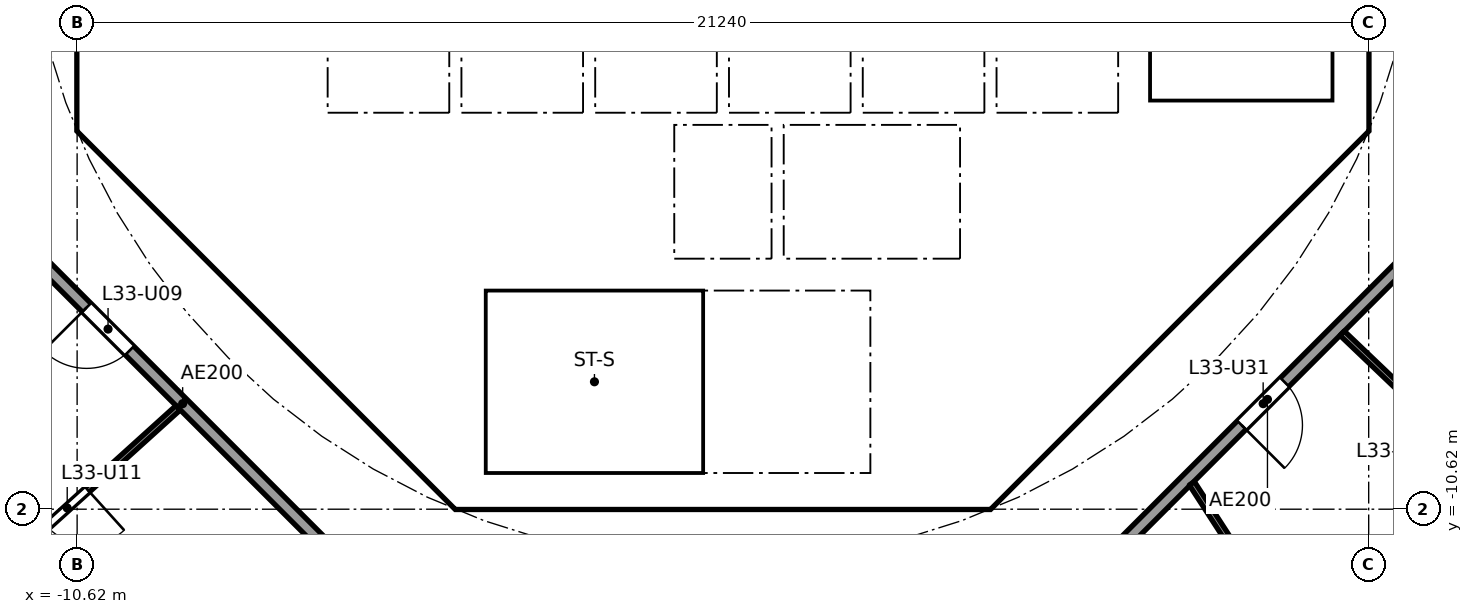
"""IFC4 building model, lengths in metres.
Left out: names, types, materials, properties, quantities, classifications, styles, units other than length and angle.
Written with IfcOpenShell. Run it as: python <this file> out.ifc"""

import sys

from ifc_helpers import new_model, si_unit, direction, frame, frame_2d, origin, place, context, subcontext, project, spatial, polyline, rectangle, outline, extrude, element, fill, save


model = new_model("IFC4")
c1 = context("Model", 3, precision=1e-05, world=origin(), true_north=direction((0.0, 1.0)))
c2 = subcontext(c1, "Body", "Model", "MODEL_VIEW")
j1 = project(units=[si_unit("LENGTHUNIT", "METRE"), si_unit("PLANEANGLEUNIT", "RADIAN")], contexts=[c1])
p1 = place(None, origin())
s1 = spatial("IfcSite", under=j1, at=p1, CompositionType="ELEMENT")
p2 = place(p1, origin())
s2 = spatial("IfcBuilding", under=s1, at=p2, CompositionType="ELEMENT")
p3 = place(p2, frame((0.0, 0.0, 134.4)))
s3 = spatial("IfcBuildingStorey", under=s2, at=p3, CompositionType="ELEMENT", Elevation=134.4)
p4 = place(p3, frame((-10.325, 3.801, 0.0), z_axis=(0.0, 0.0, 1.0), x_axis=(0.0, -1.0, 0.0)))
e1 = element("IfcWall", 1, at=p4, inside=s3, PredefinedType="SHEAR", context=c2, shape_type="SweptSolid", body=[
    extrude(rectangle(XDim=7.602, YDim=0.6, at=frame_2d((3.801, 0.0))), origin(), (0.0, 0.0, 1.0), 3.44),
])
p5 = place(p4, frame((0.651, 0.0, 0.0)))
e2 = element("IfcOpeningElement", 2, at=p5, cuts=e1, PredefinedType="OPENING", context=c2, shape_type="SweptSolid", body=[
    extrude(rectangle(XDim=1.5, YDim=2.1, at=frame_2d((0.75, 1.05))), frame((0.0, 0.31, 0.0), z_axis=(0.0, -1.0, 0.0), x_axis=(1.0, 0.0, 0.0)), (0.0, 0.0, 1.0), 0.62),
])
p6 = place(p4, frame((5.451, 0.0, 0.0)))
e3 = element("IfcOpeningElement", 3, at=p6, cuts=e1, PredefinedType="OPENING", context=c2, shape_type="SweptSolid", body=[
    extrude(rectangle(XDim=1.5, YDim=2.1, at=frame_2d((0.75, 1.05))), frame((0.0, 0.31, 0.0), z_axis=(0.0, -1.0, 0.0), x_axis=(1.0, 0.0, 0.0)), (0.0, 0.0, 1.0), 0.62),
])
p7 = place(p3, frame((-9.988, -4.613, 0.0), z_axis=(0.0, 0.0, 1.0), x_axis=(0.707106781187, -0.707106781187, 0.0)))
e4 = element("IfcWall", 4, at=p7, inside=s3, PredefinedType="SHEAR", context=c2, shape_type="SweptSolid", body=[
    extrude(rectangle(XDim=7.602, YDim=0.6, at=frame_2d((3.801, 0.0))), origin(), (0.0, 0.0, 1.0), 3.44),
])
p8 = place(p7, frame((6.151, 0.0, 0.0)))
e5 = element("IfcOpeningElement", 5, at=p8, cuts=e4, PredefinedType="OPENING", context=c2, shape_type="SweptSolid", body=[
    extrude(rectangle(XDim=1.1, YDim=2.1, at=frame_2d((0.55, 1.05))), frame((0.0, 0.31, 0.0), z_axis=(0.0, -1.0, 0.0), x_axis=(1.0, 0.0, 0.0)), (0.0, 0.0, 1.0), 0.62),
])
p9 = place(p3, frame((4.613, -9.988, 0.0), z_axis=(0.0, 0.0, 1.0), x_axis=(0.707106781187, 0.707106781187, 0.0)))
e6 = element("IfcWall", 6, at=p9, inside=s3, PredefinedType="SHEAR", context=c2, shape_type="SweptSolid", body=[
    extrude(rectangle(XDim=7.602, YDim=0.6, at=frame_2d((3.801, 0.0))), origin(), (0.0, 0.0, 1.0), 3.44),
])
p10 = place(p9, frame((3.201, 0.0, 0.0)))
e7 = element("IfcOpeningElement", 7, at=p10, cuts=e6, PredefinedType="OPENING", context=c2, shape_type="SweptSolid", body=[
    extrude(rectangle(XDim=1.2, YDim=2.1, at=frame_2d((0.6, 1.05))), frame((0.0, 0.31, 0.0), z_axis=(0.0, -1.0, 0.0), x_axis=(1.0, 0.0, 0.0)), (0.0, 0.0, 1.0), 0.62),
])
p11 = place(p3, frame((4.0, -10.025, 0.0), z_axis=(0.0, 0.0, 1.0), x_axis=(0.0, 1.0, 0.0)))
e8 = element("IfcWall", 8, at=p11, inside=s3, PredefinedType="SOLIDWALL", context=c2, shape_type="SweptSolid", body=[
    extrude(rectangle(XDim=3.0, YDim=0.2, at=frame_2d((1.5, 0.0))), origin(), (0.0, 0.0, 1.0), 3.44),
])
p12 = place(p11, frame((0.975, 0.0, 0.0)))
e9 = element("IfcOpeningElement", 9, at=p12, cuts=e8, PredefinedType="OPENING", context=c2, shape_type="SweptSolid", body=[
    extrude(rectangle(XDim=1.1, YDim=2.1, at=frame_2d((0.55, 1.05))), frame((0.0, 0.11, 0.0), z_axis=(0.0, -1.0, 0.0), x_axis=(1.0, 0.0, 0.0)), (0.0, 0.0, 1.0), 0.22),
])
p13 = place(p3, frame((-6.2, -7.827, 0.0), z_axis=(0.0, 0.0, 1.0), x_axis=(0.0, 1.0, 0.0)))
e10 = element("IfcWall", 10, at=p13, inside=s3, PredefinedType="PARTITIONING", context=c2, shape_type="SweptSolid", body=[
    extrude(rectangle(XDim=3.527, YDim=0.15, at=frame_2d((1.763, 0.0))), origin(), (0.0, 0.0, 1.0), 3.44),
])
p14 = place(p13, frame((2.365, 0.0, 0.0)))
e11 = element("IfcOpeningElement", 11, at=p14, cuts=e10, PredefinedType="OPENING", context=c2, shape_type="SweptSolid", body=[
    extrude(rectangle(XDim=0.9, YDim=2.1, at=frame_2d((0.45, 1.05))), frame((0.0, 0.085, 0.0), z_axis=(0.0, -1.0, 0.0), x_axis=(1.0, 0.0, 0.0)), (0.0, 0.0, 1.0), 0.17),
])
p15 = place(p13, frame((0.489, 0.0, 0.0)))
e12 = element("IfcOpeningElement", 12, at=p15, cuts=e10, PredefinedType="OPENING", context=c2, shape_type="SweptSolid", body=[
    extrude(rectangle(XDim=0.9, YDim=2.1, at=frame_2d((0.45, 1.05))), frame((0.0, 0.085, 0.0), z_axis=(0.0, -1.0, 0.0), x_axis=(1.0, 0.0, 0.0)), (0.0, 0.0, 1.0), 0.17),
])
p16 = place(p3, frame((4.0, -6.5, 0.0), z_axis=(0.0, 0.0, 1.0), x_axis=(0.0, 1.0, 0.0)))
e13 = element("IfcWall", 13, at=p16, inside=s3, PredefinedType="SOLIDWALL", context=c2, shape_type="SweptSolid", body=[
    extrude(rectangle(XDim=2.2, YDim=0.2, at=frame_2d((1.1, 0.0))), origin(), (0.0, 0.0, 1.0), 3.44),
])
p17 = place(p16, frame((0.55, 0.0, 0.0)))
e14 = element("IfcOpeningElement", 14, at=p17, cuts=e13, PredefinedType="OPENING", context=c2, shape_type="SweptSolid", body=[
    extrude(rectangle(XDim=1.1, YDim=2.1, at=frame_2d((0.55, 1.05))), frame((0.0, 0.11, 0.0), z_axis=(0.0, -1.0, 0.0), x_axis=(1.0, 0.0, 0.0)), (0.0, 0.0, 1.0), 0.22),
])
p18 = place(p3, frame((-4.0, -6.5, 0.0), z_axis=(0.0, 0.0, 1.0), x_axis=(0.0, 1.0, 0.0)))
e15 = element("IfcWall", 15, at=p18, inside=s3, PredefinedType="SOLIDWALL", context=c2, shape_type="SweptSolid", body=[
    extrude(rectangle(XDim=2.2, YDim=0.2, at=frame_2d((1.1, 0.0))), origin(), (0.0, 0.0, 1.0), 3.44),
])
p19 = place(p18, frame((0.65, 0.0, 0.0)))
e16 = element("IfcOpeningElement", 16, at=p19, cuts=e15, PredefinedType="OPENING", context=c2, shape_type="SweptSolid", body=[
    extrude(rectangle(XDim=0.9, YDim=2.1, at=frame_2d((0.45, 1.05))), frame((0.0, 0.11, 0.0), z_axis=(0.0, -1.0, 0.0), x_axis=(1.0, 0.0, 0.0)), (0.0, 0.0, 1.0), 0.22),
])
p20 = place(p3, origin())
e17 = element("IfcWall", 17, at=p20, inside=s3, PredefinedType="SHEAR", context=c2, shape_type="SweptSolid", body=[
    extrude(outline(polyline([(-10.625, -3.801), (-10.025, -3.801), (-10.025, -4.152), (-9.776, -4.401), (-10.2, -4.825), (-10.625, -4.401), (-10.625, -3.801)])), origin(), (0.0, 0.0, 1.0), 3.44),
])
p21 = place(p3, origin())
e18 = element("IfcWall", 18, at=p21, inside=s3, PredefinedType="SHEAR", context=c2, shape_type="SweptSolid", body=[
    extrude(outline(polyline([(-4.152, -10.025), (4.152, -10.025), (4.401, -9.776), (4.825, -10.2), (4.401, -10.625), (-4.401, -10.625), (-4.825, -10.2), (-4.401, -9.776), (-4.152, -10.025)])), origin(), (0.0, 0.0, 1.0), 3.44),
])
p22 = place(p3, origin())
e19 = element("IfcWall", 19, at=p22, inside=s3, PredefinedType="SHEAR", context=c2, shape_type="SweptSolid", body=[
    extrude(outline(polyline([(9.776, -4.401), (10.025, -4.152), (10.025, -3.801), (10.025, 4.152), (9.776, 4.401), (10.2, 4.825), (10.625, 4.401), (10.625, -4.401), (10.2, -4.825), (9.776, -4.401)])), origin(), (0.0, 0.0, 1.0), 3.44),
])
p23 = place(p3, frame((-10.025, -4.0, 0.0), z_axis=(0.0, 0.0, 1.0), x_axis=(1.0, 0.0, 0.0)))
e20 = element("IfcWall", 20, at=p23, inside=s3, PredefinedType="PARTITIONING", context=c2, shape_type="SweptSolid", body=[
    extrude(rectangle(XDim=3.325, YDim=0.2, at=frame_2d((1.662, 0.0))), origin(), (0.0, 0.0, 1.0), 3.44),
])
p24 = place(p3, frame((-8.301, -5.8, 0.0), z_axis=(0.0, 0.0, 1.0), x_axis=(1.0, 0.0, 0.0)))
e21 = element("IfcWall", 21, at=p24, inside=s3, PredefinedType="PARTITIONING", context=c2, shape_type="SweptSolid", body=[
    extrude(rectangle(XDim=2.026, YDim=0.15, at=frame_2d((1.013, 0.0))), origin(), (0.0, 0.0, 1.0), 3.44),
])
for number, where, z_axis, x_axis in (
    (22, (-0.9, -6.5, 0.0), (0.0, 0.0, 1.0), (0.0, 1.0, 0.0)),
    (23, (0.9, -6.5, 0.0), (0.0, 0.0, 1.0), (0.0, 1.0, 0.0)),
):
    element("IfcWall", number, at=place(p3, frame(where, z_axis=z_axis, x_axis=x_axis)), inside=s3, PredefinedType="SOLIDWALL", context=c2, shape_type="SweptSolid", body=[
        extrude(rectangle(XDim=2.2, YDim=0.2, at=frame_2d((1.1, 0.0))), origin(), (0.0, 0.0, 1.0), 3.44),
    ])
p25 = place(p3, origin())
e24 = element("IfcWall", 24, at=p25, inside=s3, PredefinedType="SOLIDWALL", context=c2, shape_type="SweptSolid", body=[
    extrude(outline(polyline([(-6.7, -2.1), (-6.5, -2.1), (-6.5, -4.1), (-4.5, -4.1), (-4.5, -2.1), (-4.3, -2.1), (-4.3, -4.1), (-2.3, -4.1), (-2.3, -2.1), (-2.1, -2.1), (-2.1, -4.1), (-0.1, -4.1), (-0.1, -2.1), (0.1, -2.1), (0.1, -4.1), (2.1, -4.1), (2.1, -2.1), (2.3, -2.1), (2.3, -4.1), (4.3, -4.1), (4.3, -2.1), (4.5, -2.1), (4.5, -4.1), (6.5, -4.1), (6.5, -2.1), (6.7, -2.1), (6.7, -4.3), (-6.7, -4.3), (-6.7, -2.1)])), origin(), (0.0, 0.0, 1.0), 3.44),
])
p26 = place(p3, origin())
e25 = element("IfcWall", 25, at=p26, inside=s3, PredefinedType="SOLIDWALL", context=c2, shape_type="SweptSolid", body=[
    extrude(outline(polyline([(-3.9, -10.025), (-4.1, -10.025), (-4.1, -7.025), (-3.9, -7.025), (-3.9, -10.025)])), origin(), (0.0, 0.0, 1.0), 3.44),
])
p27 = place(p3, origin())
e26 = element("IfcWall", 26, at=p27, inside=s3, PredefinedType="SOLIDWALL", context=c2, shape_type="SweptSolid", body=[
    extrude(outline(polyline([(4.1, -7.025), (-4.1, -7.025), (-4.1, -6.5), (4.1, -6.5), (4.1, -7.025)])), origin(), (0.0, 0.0, 1.0), 3.44),
])
p28 = place(p3, origin())
e27 = element("IfcWall", 27, at=p28, inside=s3, PredefinedType="SOLIDWALL", context=c2, shape_type="SweptSolid", body=[
    extrude(outline(polyline([(7.025, -3.9), (6.7, -3.9), (6.7, 3.9), (7.025, 3.9), (7.025, -3.9)])), origin(), (0.0, 0.0, 1.0), 3.44),
])
p29 = place(p3, origin())
e28 = element("IfcWall", 28, at=p29, inside=s3, PredefinedType="SOLIDWALL", context=c2, shape_type="SweptSolid", body=[
    extrude(outline(polyline([(10.025, -4.1), (6.7, -4.1), (6.7, -3.9), (10.025, -3.9), (10.025, -4.1)])), origin(), (0.0, 0.0, 1.0), 3.44),
])
p30 = place(p3, frame((-12.635, -5.134, 0.0), z_axis=(0.0, 0.0, 1.0), x_axis=(0.707106781187, -0.707106781187, 0.0)))
e29 = element("IfcWall", 29, at=p30, inside=s3, PredefinedType="PARTITIONING", context=c2, shape_type="SweptSolid", body=[
    extrude(rectangle(XDim=10.609, YDim=0.2, at=frame_2d((5.305, 0.0))), origin(), (0.0, 0.0, 1.0), 3.44),
])
p31 = place(p30, frame((3.07, 0.0, 0.0)))
e30 = element("IfcOpeningElement", 30, at=p31, cuts=e29, PredefinedType="OPENING", context=c2, shape_type="SweptSolid", body=[
    extrude(rectangle(XDim=1.0, YDim=2.1, at=frame_2d((0.5, 1.05))), frame((0.0, 0.11, 0.0), z_axis=(0.0, -1.0, 0.0), x_axis=(1.0, 0.0, 0.0)), (0.0, 0.0, 1.0), 0.22),
])
p32 = place(p3, frame((5.275, -12.494, 0.0), z_axis=(0.0, 0.0, 1.0), x_axis=(0.707106781187, 0.707106781187, 0.0)))
e31 = element("IfcWall", 31, at=p32, inside=s3, PredefinedType="PARTITIONING", context=c2, shape_type="SweptSolid", body=[
    extrude(rectangle(XDim=10.409, YDim=0.2, at=frame_2d((5.205, 0.0))), origin(), (0.0, 0.0, 1.0), 3.44),
])
p33 = place(p32, frame((4.604, 0.0, 0.0)))
e32 = element("IfcOpeningElement", 32, at=p33, cuts=e31, PredefinedType="OPENING", context=c2, shape_type="SweptSolid", body=[
    extrude(rectangle(XDim=1.0, YDim=2.1, at=frame_2d((0.5, 1.05))), frame((0.0, 0.11, 0.0), z_axis=(0.0, -1.0, 0.0), x_axis=(1.0, 0.0, 0.0)), (0.0, 0.0, 1.0), 0.22),
])
p34 = place(p3, frame((-8.959, -8.952, 0.0), z_axis=(0.0, 0.0, 1.0), x_axis=(-0.741982736283, -0.670418987692, 0.0)))
e33 = element("IfcWall", 33, at=p34, inside=s3, PredefinedType="PARTITIONING", context=c2, shape_type="SweptSolid", body=[
    extrude(rectangle(XDim=11.371, YDim=0.1, at=frame_2d((5.685, 0.0))), origin(), (0.0, 0.0, 1.0), 2.756),
])
p35 = place(p34, frame((2.009, 0.0, 0.0)))
e34 = element("IfcOpeningElement", 34, at=p35, cuts=e33, PredefinedType="OPENING", context=c2, shape_type="SweptSolid", body=[
    extrude(rectangle(XDim=0.9, YDim=2.1, at=frame_2d((0.45, 1.05))), frame((0.0, 0.06, 0.0), z_axis=(0.0, -1.0, 0.0), x_axis=(1.0, 0.0, 0.0)), (0.0, 0.0, 1.0), 0.12),
])
p36 = place(p34, frame((7.694, 0.0, 0.0)))
e35 = element("IfcOpeningElement", 35, at=p36, cuts=e33, PredefinedType="OPENING", context=c2, shape_type="SweptSolid", body=[
    extrude(rectangle(XDim=0.9, YDim=2.1, at=frame_2d((0.45, 1.05))), frame((0.0, 0.06, 0.0), z_axis=(0.0, -1.0, 0.0), x_axis=(1.0, 0.0, 0.0)), (0.0, 0.0, 1.0), 0.12),
])
p37 = place(p3, frame((7.712, -10.195, 0.0), z_axis=(0.0, 0.0, 1.0), x_axis=(0.543868615753, -0.839170381269, 0.0)))
e36 = element("IfcWall", 36, at=p37, inside=s3, PredefinedType="PARTITIONING", context=c2, shape_type="SweptSolid", body=[
    extrude(rectangle(XDim=10.558, YDim=0.1, at=frame_2d((5.279, 0.0))), origin(), (0.0, 0.0, 1.0), 2.756),
])
p38 = place(p37, frame((1.81, 0.0, 0.0)))
e37 = element("IfcOpeningElement", 37, at=p38, cuts=e36, PredefinedType="OPENING", context=c2, shape_type="SweptSolid", body=[
    extrude(rectangle(XDim=0.9, YDim=2.1, at=frame_2d((0.45, 1.05))), frame((0.0, 0.06, 0.0), z_axis=(0.0, -1.0, 0.0), x_axis=(1.0, 0.0, 0.0)), (0.0, 0.0, 1.0), 0.12),
])
p39 = place(p37, frame((7.064, 0.0, 0.0)))
e38 = element("IfcOpeningElement", 38, at=p39, cuts=e36, PredefinedType="OPENING", context=c2, shape_type="SweptSolid", body=[
    extrude(rectangle(XDim=0.9, YDim=2.1, at=frame_2d((0.45, 1.05))), frame((0.0, 0.06, 0.0), z_axis=(0.0, -1.0, 0.0), x_axis=(1.0, 0.0, 0.0)), (0.0, 0.0, 1.0), 0.12),
])
p40 = place(p3, frame((10.184, -7.727, 0.0), z_axis=(0.0, 0.0, 1.0), x_axis=(0.723635100101, -0.690182759783, 0.0)))
e39 = element("IfcWall", 39, at=p40, inside=s3, PredefinedType="PARTITIONING", context=c2, shape_type="SweptSolid", body=[
    extrude(rectangle(XDim=14.173, YDim=0.1, at=frame_2d((7.086, 0.0))), origin(), (0.0, 0.0, 1.0), 2.756),
])
p41 = place(p40, frame((1.565, 0.0, 0.0)))
e40 = element("IfcOpeningElement", 40, at=p41, cuts=e39, PredefinedType="OPENING", context=c2, shape_type="SweptSolid", body=[
    extrude(rectangle(XDim=0.9, YDim=2.1, at=frame_2d((0.45, 1.05))), frame((0.0, 0.06, 0.0), z_axis=(0.0, -1.0, 0.0), x_axis=(1.0, 0.0, 0.0)), (0.0, 0.0, 1.0), 0.12),
])
p42 = place(p40, frame((6.257, 0.0, 0.0)))
e41 = element("IfcOpeningElement", 41, at=p42, cuts=e39, PredefinedType="OPENING", context=c2, shape_type="SweptSolid", body=[
    extrude(rectangle(XDim=0.9, YDim=2.1, at=frame_2d((0.45, 1.05))), frame((0.0, 0.06, 0.0), z_axis=(0.0, -1.0, 0.0), x_axis=(1.0, 0.0, 0.0)), (0.0, 0.0, 1.0), 0.12),
])
p43 = place(p40, frame((11.328, 0.0, 0.0)))
e42 = element("IfcOpeningElement", 42, at=p43, cuts=e39, PredefinedType="OPENING", context=c2, shape_type="SweptSolid", body=[
    extrude(rectangle(XDim=0.9, YDim=2.1, at=frame_2d((0.45, 1.05))), frame((0.0, 0.06, 0.0), z_axis=(0.0, -1.0, 0.0), x_axis=(1.0, 0.0, 0.0)), (0.0, 0.0, 1.0), 0.12),
])
p44 = place(p17, origin())
e43 = element("IfcDoor", 43, at=p44, inside=s3, OperationType="DOUBLE_DOOR_SLIDING", PredefinedType="DOOR", context=c2, shape_type="SweptSolid", body=[
    extrude(rectangle(XDim=1.1, YDim=2.1, at=frame_2d((0.55, 1.05))), frame((0.0, 0.025, 0.0), z_axis=(0.0, -1.0, 0.0), x_axis=(1.0, 0.0, 0.0)), (0.0, 0.0, 1.0), 0.05),
])
fill(e14, e43)
p45 = place(p12, origin())
e44 = element("IfcDoor", 44, at=p45, inside=s3, OperationType="SINGLE_SWING_LEFT", PredefinedType="DOOR", context=c2, shape_type="SweptSolid", body=[
    extrude(rectangle(XDim=1.1, YDim=2.1, at=frame_2d((0.55, 1.05))), frame((0.0, 0.025, 0.0), z_axis=(0.0, -1.0, 0.0), x_axis=(1.0, 0.0, 0.0)), (0.0, 0.0, 1.0), 0.05),
])
fill(e9, e44)
p46 = place(p14, origin())
e45 = element("IfcDoor", 45, at=p46, inside=s3, OperationType="SINGLE_SWING_LEFT", PredefinedType="DOOR", context=c2, shape_type="SweptSolid", body=[
    extrude(rectangle(XDim=0.9, YDim=2.1, at=frame_2d((0.45, 1.05))), frame((0.0, 0.025, 0.0), z_axis=(0.0, -1.0, 0.0), x_axis=(1.0, 0.0, 0.0)), (0.0, 0.0, 1.0), 0.05),
])
fill(e11, e45)
p47 = place(p15, origin())
e46 = element("IfcDoor", 46, at=p47, inside=s3, OperationType="SINGLE_SWING_LEFT", PredefinedType="DOOR", context=c2, shape_type="SweptSolid", body=[
    extrude(rectangle(XDim=0.9, YDim=2.1, at=frame_2d((0.45, 1.05))), frame((0.0, 0.025, 0.0), z_axis=(0.0, -1.0, 0.0), x_axis=(1.0, 0.0, 0.0)), (0.0, 0.0, 1.0), 0.05),
])
fill(e12, e46)
p48 = place(p19, frame((0.9, 0.0, 0.0), x_axis=(-1.0, 0.0, 0.0)))
e47 = element("IfcDoor", 47, at=p48, inside=s3, OperationType="SINGLE_SWING_RIGHT", PredefinedType="DOOR", context=c2, shape_type="SweptSolid", body=[
    extrude(rectangle(XDim=0.9, YDim=2.1, at=frame_2d((0.45, 1.05))), frame((0.0, 0.025, 0.0), z_axis=(0.0, -1.0, 0.0), x_axis=(1.0, 0.0, 0.0)), (0.0, 0.0, 1.0), 0.05),
])
fill(e16, e47)
p49 = place(p10, origin())
e48 = element("IfcDoor", 48, at=p49, inside=s3, OperationType="SINGLE_SWING_LEFT", PredefinedType="DOOR", context=c2, shape_type="SweptSolid", body=[
    extrude(rectangle(XDim=1.2, YDim=2.1, at=frame_2d((0.6, 1.05))), frame((0.0, 0.025, 0.0), z_axis=(0.0, -1.0, 0.0), x_axis=(1.0, 0.0, 0.0)), (0.0, 0.0, 1.0), 0.05),
])
fill(e7, e48)
p50 = place(p6, origin())
e49 = element("IfcDoor", 49, at=p50, inside=s3, OperationType="DOUBLE_DOOR_SINGLE_SWING", PredefinedType="DOOR", context=c2, shape_type="SweptSolid", body=[
    extrude(rectangle(XDim=1.5, YDim=2.1, at=frame_2d((0.75, 1.05))), frame((0.0, 0.025, 0.0), z_axis=(0.0, -1.0, 0.0), x_axis=(1.0, 0.0, 0.0)), (0.0, 0.0, 1.0), 0.05),
])
fill(e3, e49)
p51 = place(p8, origin())
e50 = element("IfcDoor", 50, at=p51, inside=s3, OperationType="SINGLE_SWING_LEFT", PredefinedType="DOOR", context=c2, shape_type="SweptSolid", body=[
    extrude(rectangle(XDim=1.1, YDim=2.1, at=frame_2d((0.55, 1.05))), frame((0.0, 0.025, 0.0), z_axis=(0.0, -1.0, 0.0), x_axis=(1.0, 0.0, 0.0)), (0.0, 0.0, 1.0), 0.05),
])
fill(e5, e50)
p52 = place(p31, frame((1.0, 0.0, 0.0), x_axis=(-1.0, 0.0, 0.0)))
e51 = element("IfcDoor", 51, at=p52, inside=s3, OperationType="SINGLE_SWING_RIGHT", PredefinedType="DOOR", context=c2, shape_type="SweptSolid", body=[
    extrude(rectangle(XDim=1.0, YDim=2.1, at=frame_2d((0.5, 1.05))), frame((0.0, 0.025, 0.0), z_axis=(0.0, -1.0, 0.0), x_axis=(1.0, 0.0, 0.0)), (0.0, 0.0, 1.0), 0.05),
])
fill(e30, e51)
p53 = place(p35, origin())
e52 = element("IfcDoor", 52, at=p53, inside=s3, OperationType="SINGLE_SWING_LEFT", PredefinedType="DOOR", context=c2, shape_type="SweptSolid", body=[
    extrude(rectangle(XDim=0.9, YDim=2.1, at=frame_2d((0.45, 1.05))), frame((0.0, 0.025, 0.0), z_axis=(0.0, -1.0, 0.0), x_axis=(1.0, 0.0, 0.0)), (0.0, 0.0, 1.0), 0.05),
])
fill(e34, e52)
p54 = place(p33, frame((1.0, 0.0, 0.0), x_axis=(-1.0, 0.0, 0.0)))
e53 = element("IfcDoor", 53, at=p54, inside=s3, OperationType="SINGLE_SWING_RIGHT", PredefinedType="DOOR", context=c2, shape_type="SweptSolid", body=[
    extrude(rectangle(XDim=1.0, YDim=2.1, at=frame_2d((0.5, 1.05))), frame((0.0, 0.025, 0.0), z_axis=(0.0, -1.0, 0.0), x_axis=(1.0, 0.0, 0.0)), (0.0, 0.0, 1.0), 0.05),
])
fill(e32, e53)
save(model, sys.argv[1])
